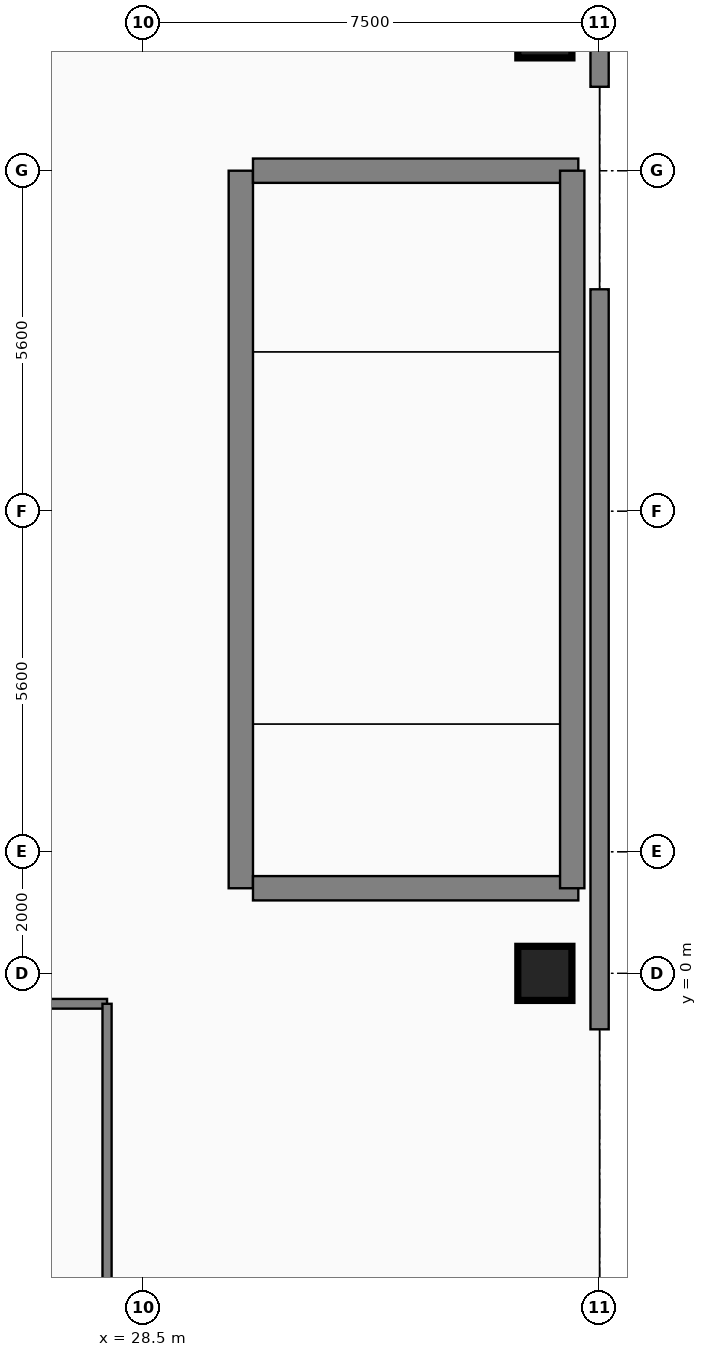
"""IFC4 building model, lengths in metres.
Left out: names, types, materials, properties, quantities, classifications, styles, units other than length and angle.
Written with IfcOpenShell. Run it as: python <this file> out.ifc"""

import sys

from ifc_helpers import new_model, si_unit, direction, frame, frame_2d, origin, origin_2d, place, context, subcontext, project, spatial, rectangle, extrude, element, fill, save


model = new_model("IFC4")
c1 = context("Model", 3, precision=1e-05, world=origin(), true_north=direction((0.0, 1.0)))
c2 = subcontext(c1, "Body", "Model", "MODEL_VIEW")
j1 = project(units=[si_unit("LENGTHUNIT", "METRE"), si_unit("PLANEANGLEUNIT", "RADIAN")], contexts=[c1])
p1 = place(None, origin())
s1 = spatial("IfcSite", under=j1, at=p1, CompositionType="ELEMENT")
p2 = place(p1, origin())
s2 = spatial("IfcBuilding", under=s1, at=p2, CompositionType="ELEMENT")
p3 = place(p2, frame((0.0, 0.0, 11.4)))
s3 = spatial("IfcBuildingStorey", under=s2, at=p3, CompositionType="ELEMENT", Elevation=11.4)
p4 = place(p3, frame((30.1, 13.2, 0.0), z_axis=(0.0, 0.0, 1.0), x_axis=(0.0, -1.0, 0.0)))
e1 = element("IfcWall", 1, at=p4, inside=s3, PredefinedType="SHEAR", context=c2, shape_type="SweptSolid", body=[
    extrude(rectangle(XDim=11.8, YDim=0.4, at=frame_2d((5.9, 0.0))), origin(), (0.0, 0.0, 1.0), 6.41),
])
p5 = place(p4, frame((9.7, 0.0, 0.0)))
e2 = element("IfcOpeningElement", 2, at=p5, cuts=e1, PredefinedType="OPENING", context=c2, shape_type="SweptSolid", body=[
    extrude(rectangle(XDim=1.12, YDim=2.22, at=frame_2d((0.56, 1.11))), frame((0.0, 0.21, 0.0), z_axis=(0.0, -1.0, 0.0), x_axis=(1.0, 0.0, 0.0)), (0.0, 0.0, 1.0), 0.42),
])
for number, where, z_axis, x_axis in (
    (3, (30.3, 1.4, 0.0), (0.0, 0.0, 1.0), (1.0, 0.0, 0.0)),
    (4, (30.3, 13.2, 0.0), (0.0, 0.0, 1.0), (1.0, 0.0, 0.0)),
):
    element("IfcWall", number, at=place(p3, frame(where, z_axis=z_axis, x_axis=x_axis)), inside=s3, PredefinedType="SHEAR", context=c2, shape_type="SweptSolid", body=[
        extrude(rectangle(XDim=5.35, YDim=0.4, at=frame_2d((2.675, 0.0))), origin(), (0.0, 0.0, 1.0), 6.41),
    ])
p6 = place(p3, frame((35.55, 1.4, 0.0), z_axis=(0.0, 0.0, 1.0), x_axis=(0.0, 1.0, 0.0)))
e5 = element("IfcWall", 5, at=p6, inside=s3, PredefinedType="SHEAR", context=c2, shape_type="SweptSolid", body=[
    extrude(rectangle(XDim=11.8, YDim=0.4, at=frame_2d((5.9, 0.0))), origin(), (0.0, 0.0, 1.0), 6.41),
])
for number, where, z_axis, x_axis in (
    (6, (35.1, 0.0, 0.0), (0.0, 0.0, 1.0), (1.0, 0.0, 0.0)),
    (7, (35.1, 15.5, 0.0), (0.0, 0.0, 1.0), (1.0, 0.0, 0.0)),
):
    element("IfcColumn", number, at=place(p3, frame(where, z_axis=z_axis, x_axis=x_axis)), inside=s3, PredefinedType="COLUMN", context=c2, shape_type="SweptSolid", body=[
        extrude(rectangle(XDim=0.85, YDim=0.85, at=origin_2d()), origin(), (0.0, 0.0, 1.0), 6.6),
    ])
p7 = place(p3, frame((36.0, 16.42, 0.0), z_axis=(0.0, 0.0, 1.0), x_axis=(0.0, -1.0, 0.0)))
e8 = element("IfcWall", 8, at=p7, inside=s3, PredefinedType="STANDARD", context=c2, shape_type="SweptSolid", body=[
    extrude(rectangle(XDim=1.84, YDim=0.3, at=frame_2d((0.92, 0.0))), origin(), (0.0, 0.0, 1.0), 6.34),
])
p8 = place(p3, frame((36.0, 11.25, 0.0), z_axis=(0.0, 0.0, 1.0), x_axis=(0.0, -1.0, 0.0)))
e9 = element("IfcWall", 9, at=p8, inside=s3, PredefinedType="STANDARD", context=c2, shape_type="SweptSolid", body=[
    extrude(rectangle(XDim=12.17, YDim=0.3, at=frame_2d((6.085, 0.0))), origin(), (0.0, 0.0, 1.0), 6.34),
])
p9 = place(p3, frame((18.6, -0.5, 0.0), z_axis=(0.0, 0.0, 1.0), x_axis=(1.0, 0.0, 0.0)))
e10 = element("IfcWall", 10, at=p9, inside=s3, PredefinedType="PARTITIONING", context=c2, shape_type="SweptSolid", body=[
    extrude(rectangle(XDim=9.3, YDim=0.16, at=frame_2d((4.65, 0.0))), origin(), (0.0, 0.0, 1.0), 6.34),
])
p10 = place(p9, frame((5.91, 0.0, 0.0)))
e11 = element("IfcOpeningElement", 11, at=p10, cuts=e10, PredefinedType="OPENING", context=c2, shape_type="SweptSolid", body=[
    extrude(rectangle(XDim=1.08, YDim=2.18, at=frame_2d((0.54, 1.09))), frame((0.0, 0.09, 0.0), z_axis=(0.0, -1.0, 0.0), x_axis=(1.0, 0.0, 0.0)), (0.0, 0.0, 1.0), 0.18),
])
p11 = place(p3, frame((27.9, -23.94, 0.0), z_axis=(0.0, 0.0, 1.0), x_axis=(0.0, 1.0, 0.0)))
e12 = element("IfcWall", 12, at=p11, inside=s3, PredefinedType="PARTITIONING", context=c2, shape_type="SweptSolid", body=[
    extrude(rectangle(XDim=23.44, YDim=0.15, at=frame_2d((11.72, 0.0))), origin(), (0.0, 0.0, 1.0), 6.34),
])
p12 = place(p5, origin())
e13 = element("IfcDoor", 13, at=p12, inside=s3, OperationType="SINGLE_SWING_LEFT", PredefinedType="DOOR", context=c2, shape_type="SweptSolid", body=[
    extrude(rectangle(XDim=1.12, YDim=2.22, at=frame_2d((0.56, 1.11))), frame((0.0, 0.025, 0.0), z_axis=(0.0, -1.0, 0.0), x_axis=(1.0, 0.0, 0.0)), (0.0, 0.0, 1.0), 0.05),
])
fill(e2, e13)
save(model, sys.argv[1])
